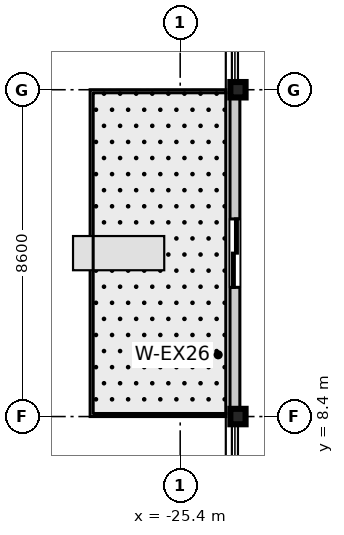
"""IFC4 building model, lengths in metres.
Left out: names, types, materials, properties, quantities, classifications, styles, units other than length and angle.
Written with IfcOpenShell. Run it as: python <this file> out.ifc"""

import sys

from ifc_helpers import new_model, si_unit, direction, frame, frame_2d, origin, origin_2d, place, context, subcontext, project, spatial, rectangle, i_section, extrude, source, transform, mapped, element, fill, save


model = new_model("IFC4")
c1 = context("Model", 3, precision=1e-05, world=origin(), true_north=direction((0.0, 1.0)))
c2 = subcontext(c1, "Body", "Model", "MODEL_VIEW")
j1 = project(units=[si_unit("LENGTHUNIT", "METRE"), si_unit("PLANEANGLEUNIT", "RADIAN")], contexts=[c1])
p1 = place(None, origin())
s1 = spatial("IfcSite", under=j1, at=p1, CompositionType="ELEMENT")
p2 = place(p1, origin())
s2 = spatial("IfcBuilding", under=s1, at=p2, CompositionType="ELEMENT")
p3 = place(p2, frame((0.0, 0.0, 212.3)))
s3 = spatial("IfcBuildingStorey", under=s2, at=p3, CompositionType="ELEMENT", Elevation=212.3)
m1 = source(origin(), c2, "Body", "SweptSolid", [
    extrude(i_section(OverallWidth=0.401, OverallDepth=0.406, WebThickness=0.016, FlangeThickness=0.025, at=origin_2d()), origin(), (0.0, 0.0, 1.0), 3.655),
])
for number, where, z_axis, x_axis in (
    (1, (-23.88, 8.4, 0.0), (0.0, 0.0, 1.0), (1.0, 0.0, 0.0)),
    (2, (-23.88, 17.0, 0.0), (0.0, 0.0, 1.0), (1.0, 0.0, 0.0)),
):
    element("IfcColumn", number, at=place(p3, frame(where, z_axis=z_axis, x_axis=x_axis)), inside=s3, PredefinedType="COLUMN", context=c2, shape_type="MappedRepresentation", body=[
        mapped(m1, transform((0.0, 0.0, 0.0), scale=1.0)),
    ])
m2 = source(origin(), c2, "Body", "SweptSolid", [
    extrude(rectangle(XDim=8.6, YDim=0.26, at=frame_2d((4.3, 0.0))), origin(), (0.0, 0.0, 1.0), 2.89),
])
p4 = place(p3, frame((-23.96, 8.4, 0.0), z_axis=(0.0, 0.0, 1.0), x_axis=(0.0, 1.0, 0.0)))
e3 = element("IfcWall", 3, at=p4, inside=s3, PredefinedType="STANDARD", context=c2, shape_type="MappedRepresentation", body=[
    mapped(m2, transform((0.0, 0.0, 0.0), scale=1.0)),
])
p5 = place(p4, frame((3.4, 0.0, 0.0)))
e4 = element("IfcOpeningElement", 4, at=p5, cuts=e3, PredefinedType="OPENING", context=c2, shape_type="SweptSolid", body=[
    extrude(rectangle(XDim=1.8, YDim=2.25, at=frame_2d((0.9, 1.125))), frame((0.0, 0.14, 0.0), z_axis=(0.0, -1.0, 0.0), x_axis=(1.0, 0.0, 0.0)), (0.0, 0.0, 1.0), 0.28),
])
m3 = source(origin(), c2, "Body", "SweptSolid", [
    extrude(rectangle(XDim=1.8, YDim=2.25, at=frame_2d((0.9, 1.125))), frame((0.0, 0.025, 0.0), z_axis=(0.0, -1.0, 0.0), x_axis=(1.0, 0.0, 0.0)), (0.0, 0.0, 1.0), 0.05),
])
p6 = place(p5, origin())
e5 = element("IfcDoor", 5, at=p6, inside=s3, OperationType="DOUBLE_DOOR_SLIDING", PredefinedType="DOOR", context=c2, shape_type="MappedRepresentation", body=[
    mapped(m3, transform((0.0, 0.0, 0.0), scale=1.0)),
])
fill(e4, e5)
save(model, sys.argv[1])
